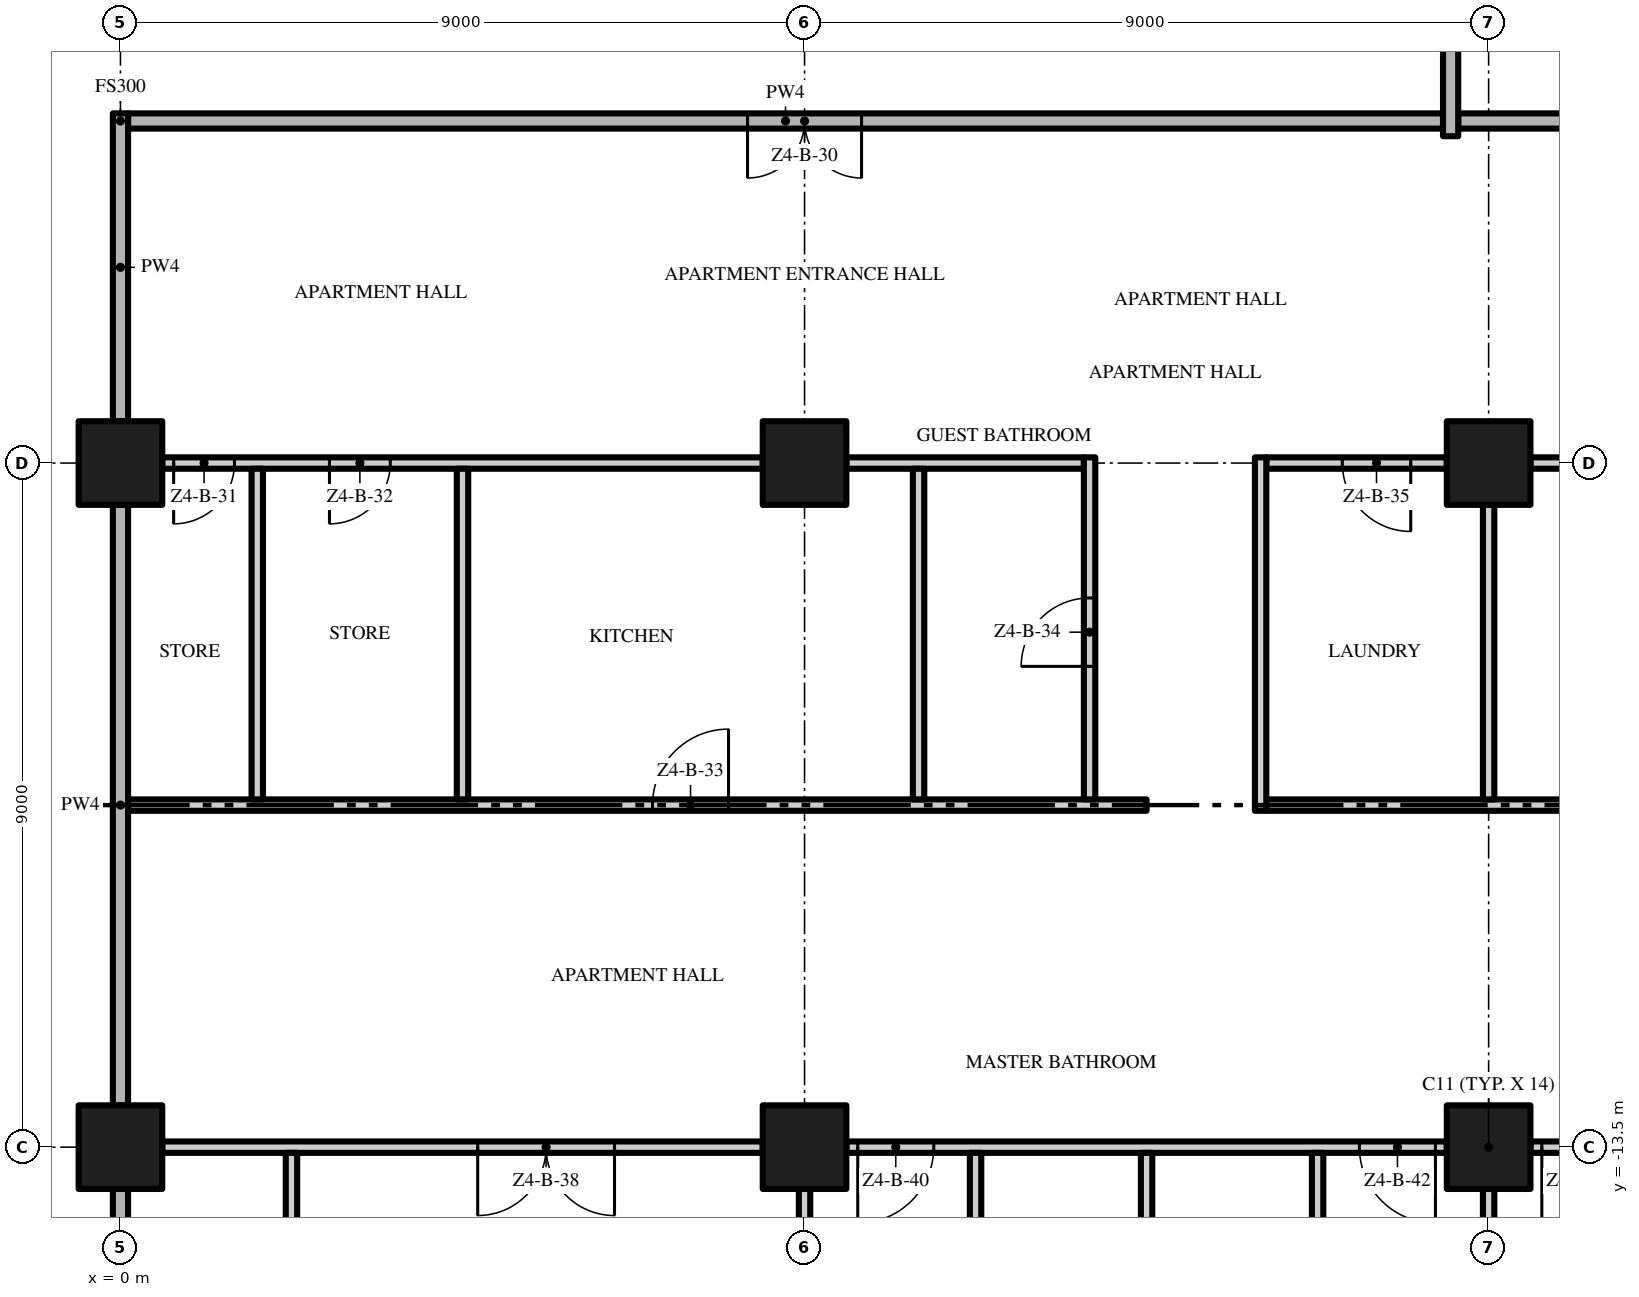
"""IFC4 building model, lengths in metres.
Left out: names, types, materials, properties, quantities, classifications, styles, units other than length and angle.
Written with IfcOpenShell. Run it as: python <this file> out.ifc"""

import sys

from ifc_helpers import new_model, si_unit, direction, frame, frame_2d, origin, origin_2d, place, context, subcontext, project, spatial, rectangle, extrude, element, fill, save


model = new_model("IFC4")
c1 = context("Model", 3, precision=1e-05, world=origin(), true_north=direction((0.0, 1.0)))
c2 = subcontext(c1, "Body", "Model", "MODEL_VIEW")
j1 = project(units=[si_unit("LENGTHUNIT", "METRE"), si_unit("PLANEANGLEUNIT", "RADIAN")], contexts=[c1])
p1 = place(None, origin())
s1 = spatial("IfcSite", under=j1, at=p1, CompositionType="ELEMENT")
p2 = place(p1, origin())
s2 = spatial("IfcBuilding", under=s1, at=p2, CompositionType="ELEMENT")
p3 = place(p2, frame((0.0, 0.0, 203.4)))
s3 = spatial("IfcBuildingStorey", under=s2, at=p3, CompositionType="ELEMENT", Elevation=203.4)
for number, where, z_axis, x_axis in (
    (1, (0.0, -13.5, 0.0), (0.0, 0.0, 1.0), (1.0, 0.0, 0.0)),
    (2, (0.0, -4.5, 0.0), (0.0, 0.0, 1.0), (1.0, 0.0, 0.0)),
    (3, (18.0, -13.5, 0.0), (0.0, 0.0, 1.0), (1.0, 0.0, 0.0)),
    (4, (18.0, -4.5, 0.0), (0.0, 0.0, 1.0), (1.0, 0.0, 0.0)),
    (5, (9.0, -13.5, 0.0), (0.0, 0.0, 1.0), (1.0, 0.0, 0.0)),
    (6, (9.0, -4.5, 0.0), (0.0, 0.0, 1.0), (1.0, 0.0, 0.0)),
):
    element("IfcColumn", number, at=place(p3, frame(where, z_axis=z_axis, x_axis=x_axis)), inside=s3, PredefinedType="COLUMN", context=c2, shape_type="SweptSolid", body=[
        extrude(rectangle(XDim=1.1, YDim=1.1, at=origin_2d()), origin(), (0.0, 0.0, 1.0), 3.5),
    ])
p4 = place(p3, frame((8.45, -13.5, 0.0), z_axis=(0.0, 0.0, 1.0), x_axis=(-1.0, 0.0, 0.0)))
e7 = element("IfcWall", 7, at=p4, inside=s3, PredefinedType="PARTITIONING", context=c2, shape_type="SweptSolid", body=[
    extrude(rectangle(XDim=7.9, YDim=0.15, at=frame_2d((3.95, 0.0))), origin(), (0.0, 0.0, 1.0), 3.5),
])
p5 = place(p4, frame((1.95, 0.0, 0.0)))
e8 = element("IfcOpeningElement", 8, at=p5, cuts=e7, PredefinedType="OPENING", context=c2, shape_type="SweptSolid", body=[
    extrude(rectangle(XDim=1.8, YDim=2.4, at=frame_2d((0.9, 1.2))), frame((0.0, 0.085, 0.0), z_axis=(0.0, -1.0, 0.0), x_axis=(1.0, 0.0, 0.0)), (0.0, 0.0, 1.0), 0.17),
])
p6 = place(p3, frame((17.45, -13.5, 0.0), z_axis=(0.0, 0.0, 1.0), x_axis=(-1.0, 0.0, 0.0)))
e9 = element("IfcWall", 9, at=p6, inside=s3, PredefinedType="PARTITIONING", context=c2, shape_type="SweptSolid", body=[
    extrude(rectangle(XDim=7.9, YDim=0.15, at=frame_2d((3.95, 0.0))), origin(), (0.0, 0.0, 1.0), 3.5),
])
p7 = place(p6, frame((6.75, 0.0, 0.0)))
e10 = element("IfcOpeningElement", 10, at=p7, cuts=e9, PredefinedType="OPENING", context=c2, shape_type="SweptSolid", body=[
    extrude(rectangle(XDim=1.0, YDim=2.4, at=frame_2d((0.5, 1.2))), frame((0.0, 0.085, 0.0), z_axis=(0.0, -1.0, 0.0), x_axis=(1.0, 0.0, 0.0)), (0.0, 0.0, 1.0), 0.17),
])
p8 = place(p6, frame((0.15, 0.0, 0.0)))
e11 = element("IfcOpeningElement", 11, at=p8, cuts=e9, PredefinedType="OPENING", context=c2, shape_type="SweptSolid", body=[
    extrude(rectangle(XDim=1.0, YDim=2.4, at=frame_2d((0.5, 1.2))), frame((0.0, 0.085, 0.0), z_axis=(0.0, -1.0, 0.0), x_axis=(1.0, 0.0, 0.0)), (0.0, 0.0, 1.0), 0.17),
])
p9 = place(p3, frame((26.0, -13.5, 0.0), z_axis=(0.0, 0.0, 1.0), x_axis=(-1.0, 0.0, 0.0)))
e12 = element("IfcWall", 12, at=p9, inside=s3, PredefinedType="PARTITIONING", context=c2, shape_type="SweptSolid", body=[
    extrude(rectangle(XDim=7.45, YDim=0.15, at=frame_2d((3.725, 0.0))), origin(), (0.0, 0.0, 1.0), 3.5),
])
p10 = place(p9, frame((6.3, 0.0, 0.0)))
e13 = element("IfcOpeningElement", 13, at=p10, cuts=e12, PredefinedType="OPENING", context=c2, shape_type="SweptSolid", body=[
    extrude(rectangle(XDim=1.0, YDim=2.4, at=frame_2d((0.5, 1.2))), frame((0.0, 0.085, 0.0), z_axis=(0.0, -1.0, 0.0), x_axis=(1.0, 0.0, 0.0)), (0.0, 0.0, 1.0), 0.17),
])
p11 = place(p9, frame((0.75, 0.0, 0.0)))
e14 = element("IfcOpeningElement", 14, at=p11, cuts=e12, PredefinedType="OPENING", context=c2, shape_type="SweptSolid", body=[
    extrude(rectangle(XDim=1.0, YDim=2.4, at=frame_2d((0.5, 1.2))), frame((0.0, 0.085, 0.0), z_axis=(0.0, -1.0, 0.0), x_axis=(1.0, 0.0, 0.0)), (0.0, 0.0, 1.0), 0.17),
])
p12 = place(p3, frame((0.1, -9.0, 0.0), z_axis=(0.0, 0.0, 1.0), x_axis=(1.0, 0.0, 0.0)))
e15 = element("IfcWall", 15, at=p12, inside=s3, PredefinedType="PARTITIONING", context=c2, shape_type="SweptSolid", body=[
    extrude(rectangle(XDim=13.4, YDim=0.15, at=frame_2d((6.7, 0.0))), origin(), (0.0, 0.0, 1.0), 3.5),
])
p13 = place(p12, frame((6.9, 0.0, 0.0)))
e16 = element("IfcOpeningElement", 16, at=p13, cuts=e15, PredefinedType="OPENING", context=c2, shape_type="SweptSolid", body=[
    extrude(rectangle(XDim=1.0, YDim=2.4, at=frame_2d((0.5, 1.2))), frame((0.0, 0.085, 0.0), z_axis=(0.0, -1.0, 0.0), x_axis=(1.0, 0.0, 0.0)), (0.0, 0.0, 1.0), 0.17),
])
p14 = place(p3, frame((15.075, -9.0, 0.0), z_axis=(0.0, 0.0, 1.0), x_axis=(1.0, 0.0, 0.0)))
e17 = element("IfcWall", 17, at=p14, inside=s3, PredefinedType="PARTITIONING", context=c2, shape_type="SweptSolid", body=[
    extrude(rectangle(XDim=11.625, YDim=0.15, at=frame_2d((5.812, 0.0))), origin(), (0.0, 0.0, 1.0), 3.5),
])
p15 = place(p3, frame((8.45, -4.5, 0.0), z_axis=(0.0, 0.0, 1.0), x_axis=(-1.0, 0.0, 0.0)))
e18 = element("IfcWall", 18, at=p15, inside=s3, PredefinedType="PARTITIONING", context=c2, shape_type="SweptSolid", body=[
    extrude(rectangle(XDim=7.9, YDim=0.15, at=frame_2d((3.95, 0.0))), origin(), (0.0, 0.0, 1.0), 3.5),
])
p16 = place(p15, frame((6.95, 0.0, 0.0)))
e19 = element("IfcOpeningElement", 19, at=p16, cuts=e18, PredefinedType="OPENING", context=c2, shape_type="SweptSolid", body=[
    extrude(rectangle(XDim=0.8, YDim=2.0, at=frame_2d((0.4, 1.0))), frame((0.0, 0.085, 0.0), z_axis=(0.0, -1.0, 0.0), x_axis=(1.0, 0.0, 0.0)), (0.0, 0.0, 1.0), 0.17),
])
p17 = place(p15, frame((4.9, 0.0, 0.0)))
e20 = element("IfcOpeningElement", 20, at=p17, cuts=e18, PredefinedType="OPENING", context=c2, shape_type="SweptSolid", body=[
    extrude(rectangle(XDim=0.8, YDim=2.0, at=frame_2d((0.4, 1.0))), frame((0.0, 0.085, 0.0), z_axis=(0.0, -1.0, 0.0), x_axis=(1.0, 0.0, 0.0)), (0.0, 0.0, 1.0), 0.17),
])
p18 = place(p3, frame((9.55, -4.5, 0.0), z_axis=(0.0, 0.0, 1.0), x_axis=(1.0, 0.0, 0.0)))
e21 = element("IfcWall", 21, at=p18, inside=s3, PredefinedType="PARTITIONING", context=c2, shape_type="SweptSolid", body=[
    extrude(rectangle(XDim=3.125, YDim=0.15, at=frame_2d((1.562, 0.0))), origin(), (0.0, 0.0, 1.0), 3.5),
])
p19 = place(p3, frame((17.45, -4.5, 0.0), z_axis=(0.0, 0.0, 1.0), x_axis=(-1.0, 0.0, 0.0)))
e22 = element("IfcWall", 22, at=p19, inside=s3, PredefinedType="PARTITIONING", context=c2, shape_type="SweptSolid", body=[
    extrude(rectangle(XDim=2.375, YDim=0.15, at=frame_2d((1.188, 0.0))), origin(), (0.0, 0.0, 1.0), 3.5),
])
p20 = place(p19, frame((0.475, 0.0, 0.0)))
e23 = element("IfcOpeningElement", 23, at=p20, cuts=e22, PredefinedType="OPENING", context=c2, shape_type="SweptSolid", body=[
    extrude(rectangle(XDim=0.9, YDim=2.1, at=frame_2d((0.45, 1.05))), frame((0.0, 0.085, 0.0), z_axis=(0.0, -1.0, 0.0), x_axis=(1.0, 0.0, 0.0)), (0.0, 0.0, 1.0), 0.17),
])
p21 = place(p3, frame((26.0, -4.5, 0.0), z_axis=(0.0, 0.0, 1.0), x_axis=(-1.0, 0.0, 0.0)))
e24 = element("IfcWall", 24, at=p21, inside=s3, PredefinedType="PARTITIONING", context=c2, shape_type="SweptSolid", body=[
    extrude(rectangle(XDim=7.45, YDim=0.15, at=frame_2d((3.725, 0.0))), origin(), (0.0, 0.0, 1.0), 3.5),
])
p22 = place(p21, frame((4.95, 0.0, 0.0)))
e25 = element("IfcOpeningElement", 25, at=p22, cuts=e24, PredefinedType="OPENING", context=c2, shape_type="SweptSolid", body=[
    extrude(rectangle(XDim=0.9, YDim=2.1, at=frame_2d((0.45, 1.05))), frame((0.0, 0.085, 0.0), z_axis=(0.0, -1.0, 0.0), x_axis=(1.0, 0.0, 0.0)), (0.0, 0.0, 1.0), 0.17),
])
p23 = place(p3, frame((17.4, 0.0, 0.0), z_axis=(0.0, 0.0, 1.0), x_axis=(-1.0, 0.0, 0.0)))
e26 = element("IfcWall", 26, at=p23, inside=s3, PredefinedType="PARTITIONING", context=c2, shape_type="SweptSolid", body=[
    extrude(rectangle(XDim=17.3, YDim=0.2, at=frame_2d((8.65, 0.0))), origin(), (0.0, 0.0, 1.0), 3.5),
])
p24 = place(p23, frame((7.65, 0.0, 0.0)))
e27 = element("IfcOpeningElement", 27, at=p24, cuts=e26, PredefinedType="OPENING", context=c2, shape_type="SweptSolid", body=[
    extrude(rectangle(XDim=1.5, YDim=2.4, at=frame_2d((0.75, 1.2))), frame((0.0, 0.11, 0.0), z_axis=(0.0, -1.0, 0.0), x_axis=(1.0, 0.0, 0.0)), (0.0, 0.0, 1.0), 0.22),
])
p25 = place(p3, frame((17.6, 0.0, 0.0), z_axis=(0.0, 0.0, 1.0), x_axis=(1.0, 0.0, 0.0)))
e28 = element("IfcWall", 28, at=p25, inside=s3, PredefinedType="PARTITIONING", context=c2, shape_type="SweptSolid", body=[
    extrude(rectangle(XDim=9.1, YDim=0.2, at=frame_2d((4.55, 0.0))), origin(), (0.0, 0.0, 1.0), 3.5),
])
p26 = place(p3, frame((0.0, -21.5, 0.0), z_axis=(0.0, 0.0, 1.0), x_axis=(0.0, 1.0, 0.0)))
e29 = element("IfcWall", 29, at=p26, inside=s3, PredefinedType="PARTITIONING", context=c2, shape_type="SweptSolid", body=[
    extrude(rectangle(XDim=7.45, YDim=0.2, at=frame_2d((3.725, 0.0))), origin(), (0.0, 0.0, 1.0), 3.5),
])
p27 = place(p3, frame((0.0, -12.95, 0.0), z_axis=(0.0, 0.0, 1.0), x_axis=(0.0, 1.0, 0.0)))
e30 = element("IfcWall", 30, at=p27, inside=s3, PredefinedType="PARTITIONING", context=c2, shape_type="SweptSolid", body=[
    extrude(rectangle(XDim=7.9, YDim=0.2, at=frame_2d((3.95, 0.0))), origin(), (0.0, 0.0, 1.0), 3.5),
])
p28 = place(p3, frame((0.0, -3.95, 0.0), z_axis=(0.0, 0.0, 1.0), x_axis=(0.0, 1.0, 0.0)))
e31 = element("IfcWall", 31, at=p28, inside=s3, PredefinedType="PARTITIONING", context=c2, shape_type="SweptSolid", body=[
    extrude(rectangle(XDim=4.05, YDim=0.2, at=frame_2d((2.025, 0.0))), origin(), (0.0, 0.0, 1.0), 3.5),
])
p29 = place(p3, frame((1.8, -8.925, 0.0), z_axis=(0.0, 0.0, 1.0), x_axis=(0.0, 1.0, 0.0)))
e32 = element("IfcWall", 32, at=p29, inside=s3, PredefinedType="PARTITIONING", context=c2, shape_type="SweptSolid", body=[
    extrude(rectangle(XDim=4.35, YDim=0.15, at=frame_2d((2.175, 0.0))), origin(), (0.0, 0.0, 1.0), 3.5),
])
p30 = place(p3, frame((2.25, -16.575, 0.0), z_axis=(0.0, 0.0, 1.0), x_axis=(0.0, 1.0, 0.0)))
e33 = element("IfcWall", 33, at=p30, inside=s3, PredefinedType="PARTITIONING", context=c2, shape_type="SweptSolid", body=[
    extrude(rectangle(XDim=3.0, YDim=0.15, at=frame_2d((1.5, 0.0))), origin(), (0.0, 0.0, 1.0), 3.5),
])
p31 = place(p30, frame((1.125, 0.0, 0.0)))
e34 = element("IfcOpeningElement", 34, at=p31, cuts=e33, PredefinedType="OPENING", context=c2, shape_type="SweptSolid", body=[
    extrude(rectangle(XDim=0.9, YDim=2.1, at=frame_2d((0.45, 1.05))), frame((0.0, 0.085, 0.0), z_axis=(0.0, -1.0, 0.0), x_axis=(1.0, 0.0, 0.0)), (0.0, 0.0, 1.0), 0.17),
])
p32 = place(p3, frame((4.5, -8.925, 0.0), z_axis=(0.0, 0.0, 1.0), x_axis=(0.0, 1.0, 0.0)))
e35 = element("IfcWall", 35, at=p32, inside=s3, PredefinedType="PARTITIONING", context=c2, shape_type="SweptSolid", body=[
    extrude(rectangle(XDim=4.35, YDim=0.15, at=frame_2d((2.175, 0.0))), origin(), (0.0, 0.0, 1.0), 3.5),
])
p33 = place(p3, frame((9.0, -21.5, 0.0), z_axis=(0.0, 0.0, 1.0), x_axis=(0.0, 1.0, 0.0)))
e36 = element("IfcWall", 36, at=p33, inside=s3, PredefinedType="PARTITIONING", context=c2, shape_type="SweptSolid", body=[
    extrude(rectangle(XDim=7.45, YDim=0.15, at=frame_2d((3.725, 0.0))), origin(), (0.0, 0.0, 1.0), 3.5),
])
p34 = place(p3, frame((10.5, -8.925, 0.0), z_axis=(0.0, 0.0, 1.0), x_axis=(0.0, 1.0, 0.0)))
e37 = element("IfcWall", 37, at=p34, inside=s3, PredefinedType="PARTITIONING", context=c2, shape_type="SweptSolid", body=[
    extrude(rectangle(XDim=4.35, YDim=0.15, at=frame_2d((2.175, 0.0))), origin(), (0.0, 0.0, 1.0), 3.5),
])
p35 = place(p3, frame((11.25, -16.575, 0.0), z_axis=(0.0, 0.0, 1.0), x_axis=(0.0, 1.0, 0.0)))
e38 = element("IfcWall", 38, at=p35, inside=s3, PredefinedType="PARTITIONING", context=c2, shape_type="SweptSolid", body=[
    extrude(rectangle(XDim=3.0, YDim=0.15, at=frame_2d((1.5, 0.0))), origin(), (0.0, 0.0, 1.0), 3.5),
])
p36 = place(p3, frame((12.75, -8.925, 0.0), z_axis=(0.0, 0.0, 1.0), x_axis=(0.0, 1.0, 0.0)))
e39 = element("IfcWall", 39, at=p36, inside=s3, PredefinedType="PARTITIONING", context=c2, shape_type="SweptSolid", body=[
    extrude(rectangle(XDim=4.5, YDim=0.15, at=frame_2d((2.25, 0.0))), origin(), (0.0, 0.0, 1.0), 3.5),
])
p37 = place(p36, frame((1.75, 0.0, 0.0)))
e40 = element("IfcOpeningElement", 40, at=p37, cuts=e39, PredefinedType="OPENING", context=c2, shape_type="SweptSolid", body=[
    extrude(rectangle(XDim=0.9, YDim=2.1, at=frame_2d((0.45, 1.05))), frame((0.0, 0.085, 0.0), z_axis=(0.0, -1.0, 0.0), x_axis=(1.0, 0.0, 0.0)), (0.0, 0.0, 1.0), 0.17),
])
p38 = place(p3, frame((13.5, -22.2, 0.0), z_axis=(0.0, 0.0, 1.0), x_axis=(0.0, 1.0, 0.0)))
e41 = element("IfcWall", 41, at=p38, inside=s3, PredefinedType="PARTITIONING", context=c2, shape_type="SweptSolid", body=[
    extrude(rectangle(XDim=8.625, YDim=0.15, at=frame_2d((4.312, 0.0))), origin(), (0.0, 0.0, 1.0), 3.5),
])
p39 = place(p3, frame((15.0, -9.075, 0.0), z_axis=(0.0, 0.0, 1.0), x_axis=(0.0, 1.0, 0.0)))
e42 = element("IfcWall", 42, at=p39, inside=s3, PredefinedType="PARTITIONING", context=c2, shape_type="SweptSolid", body=[
    extrude(rectangle(XDim=4.65, YDim=0.15, at=frame_2d((2.325, 0.0))), origin(), (0.0, 0.0, 1.0), 3.5),
])
p40 = place(p3, frame((15.75, -16.575, 0.0), z_axis=(0.0, 0.0, 1.0), x_axis=(0.0, 1.0, 0.0)))
e43 = element("IfcWall", 43, at=p40, inside=s3, PredefinedType="PARTITIONING", context=c2, shape_type="SweptSolid", body=[
    extrude(rectangle(XDim=3.0, YDim=0.15, at=frame_2d((1.5, 0.0))), origin(), (0.0, 0.0, 1.0), 3.5),
])
p41 = place(p3, frame((17.5, -0.2, 0.0), z_axis=(0.0, 0.0, 1.0), x_axis=(0.0, 1.0, 0.0)))
e44 = element("IfcWall", 44, at=p41, inside=s3, PredefinedType="PARTITIONING", context=c2, shape_type="SweptSolid", body=[
    extrude(rectangle(XDim=4.15, YDim=0.2, at=frame_2d((2.075, 0.0))), origin(), (0.0, 0.0, 1.0), 3.5),
])
p42 = place(p3, frame((18.0, -21.5, 0.0), z_axis=(0.0, 0.0, 1.0), x_axis=(0.0, 1.0, 0.0)))
e45 = element("IfcWall", 45, at=p42, inside=s3, PredefinedType="PARTITIONING", context=c2, shape_type="SweptSolid", body=[
    extrude(rectangle(XDim=7.45, YDim=0.15, at=frame_2d((3.725, 0.0))), origin(), (0.0, 0.0, 1.0), 3.5),
])
p43 = place(p3, frame((18.0, -8.925, 0.0), z_axis=(0.0, 0.0, 1.0), x_axis=(0.0, 1.0, 0.0)))
e46 = element("IfcWall", 46, at=p43, inside=s3, PredefinedType="PARTITIONING", context=c2, shape_type="SweptSolid", body=[
    extrude(rectangle(XDim=3.875, YDim=0.15, at=frame_2d((1.938, 0.0))), origin(), (0.0, 0.0, 1.0), 3.5),
])
p44 = place(p24, origin())
e47 = element("IfcDoor", 47, at=p44, inside=s3, OperationType="DOUBLE_DOOR_SINGLE_SWING", PredefinedType="DOOR", context=c2, shape_type="SweptSolid", body=[
    extrude(rectangle(XDim=1.5, YDim=2.4, at=frame_2d((0.75, 1.2))), frame((0.0, 0.025, 0.0), z_axis=(0.0, -1.0, 0.0), x_axis=(1.0, 0.0, 0.0)), (0.0, 0.0, 1.0), 0.05),
])
fill(e27, e47)
p45 = place(p16, origin())
e48 = element("IfcDoor", 48, at=p45, inside=s3, OperationType="SINGLE_SWING_RIGHT", PredefinedType="DOOR", context=c2, shape_type="SweptSolid", body=[
    extrude(rectangle(XDim=0.8, YDim=2.0, at=frame_2d((0.4, 1.0))), frame((0.0, 0.025, 0.0), z_axis=(0.0, -1.0, 0.0), x_axis=(1.0, 0.0, 0.0)), (0.0, 0.0, 1.0), 0.05),
])
fill(e19, e48)
p46 = place(p17, origin())
e49 = element("IfcDoor", 49, at=p46, inside=s3, OperationType="SINGLE_SWING_RIGHT", PredefinedType="DOOR", context=c2, shape_type="SweptSolid", body=[
    extrude(rectangle(XDim=0.8, YDim=2.0, at=frame_2d((0.4, 1.0))), frame((0.0, 0.025, 0.0), z_axis=(0.0, -1.0, 0.0), x_axis=(1.0, 0.0, 0.0)), (0.0, 0.0, 1.0), 0.05),
])
fill(e20, e49)
p47 = place(p13, origin())
e50 = element("IfcDoor", 50, at=p47, inside=s3, OperationType="SINGLE_SWING_RIGHT", PredefinedType="DOOR", context=c2, shape_type="SweptSolid", body=[
    extrude(rectangle(XDim=1.0, YDim=2.4, at=frame_2d((0.5, 1.2))), frame((0.0, 0.025, 0.0), z_axis=(0.0, -1.0, 0.0), x_axis=(1.0, 0.0, 0.0)), (0.0, 0.0, 1.0), 0.05),
])
fill(e16, e50)
p48 = place(p37, origin())
e51 = element("IfcDoor", 51, at=p48, inside=s3, OperationType="SINGLE_SWING_LEFT", PredefinedType="DOOR", context=c2, shape_type="SweptSolid", body=[
    extrude(rectangle(XDim=0.9, YDim=2.1, at=frame_2d((0.45, 1.05))), frame((0.0, 0.025, 0.0), z_axis=(0.0, -1.0, 0.0), x_axis=(1.0, 0.0, 0.0)), (0.0, 0.0, 1.0), 0.05),
])
fill(e40, e51)
p49 = place(p20, origin())
e52 = element("IfcDoor", 52, at=p49, inside=s3, OperationType="SINGLE_SWING_LEFT", PredefinedType="DOOR", context=c2, shape_type="SweptSolid", body=[
    extrude(rectangle(XDim=0.9, YDim=2.1, at=frame_2d((0.45, 1.05))), frame((0.0, 0.025, 0.0), z_axis=(0.0, -1.0, 0.0), x_axis=(1.0, 0.0, 0.0)), (0.0, 0.0, 1.0), 0.05),
])
fill(e23, e52)
p50 = place(p5, origin())
e53 = element("IfcDoor", 53, at=p50, inside=s3, OperationType="DOUBLE_DOOR_SINGLE_SWING", PredefinedType="DOOR", context=c2, shape_type="SweptSolid", body=[
    extrude(rectangle(XDim=1.8, YDim=2.4, at=frame_2d((0.9, 1.2))), frame((0.0, 0.025, 0.0), z_axis=(0.0, -1.0, 0.0), x_axis=(1.0, 0.0, 0.0)), (0.0, 0.0, 1.0), 0.05),
])
fill(e8, e53)
p51 = place(p7, origin())
e54 = element("IfcDoor", 54, at=p51, inside=s3, OperationType="SINGLE_SWING_RIGHT", PredefinedType="DOOR", context=c2, shape_type="SweptSolid", body=[
    extrude(rectangle(XDim=1.0, YDim=2.4, at=frame_2d((0.5, 1.2))), frame((0.0, 0.025, 0.0), z_axis=(0.0, -1.0, 0.0), x_axis=(1.0, 0.0, 0.0)), (0.0, 0.0, 1.0), 0.05),
])
fill(e10, e54)
p52 = place(p8, origin())
e55 = element("IfcDoor", 55, at=p52, inside=s3, OperationType="SINGLE_SWING_LEFT", PredefinedType="DOOR", context=c2, shape_type="SweptSolid", body=[
    extrude(rectangle(XDim=1.0, YDim=2.4, at=frame_2d((0.5, 1.2))), frame((0.0, 0.025, 0.0), z_axis=(0.0, -1.0, 0.0), x_axis=(1.0, 0.0, 0.0)), (0.0, 0.0, 1.0), 0.05),
])
fill(e11, e55)
p53 = place(p10, origin())
e56 = element("IfcDoor", 56, at=p53, inside=s3, OperationType="SINGLE_SWING_RIGHT", PredefinedType="DOOR", context=c2, shape_type="SweptSolid", body=[
    extrude(rectangle(XDim=1.0, YDim=2.4, at=frame_2d((0.5, 1.2))), frame((0.0, 0.025, 0.0), z_axis=(0.0, -1.0, 0.0), x_axis=(1.0, 0.0, 0.0)), (0.0, 0.0, 1.0), 0.05),
])
fill(e13, e56)
save(model, sys.argv[1])
